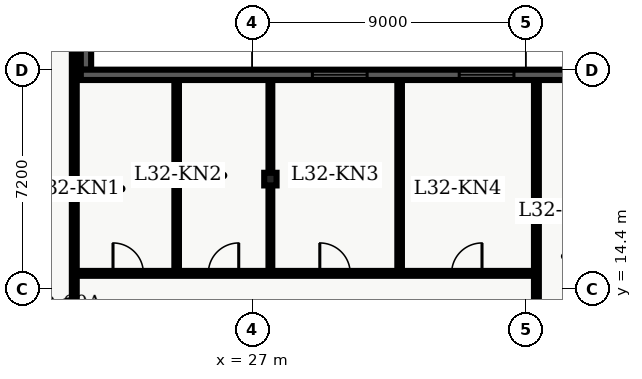
"""IFC4 building model, lengths in metres.
Left out: names, types, materials, properties, quantities, classifications, styles, units other than length and angle.
Written with IfcOpenShell. Run it as: python <this file> out.ifc"""

import sys

from ifc_helpers import new_model, entity, si_unit, converted_unit, direction, frame, origin_with_axes, origin_2d_with_axis, place, context, subcontext, project, spatial, polyline, rectangle, i_section, outline, extrude, element, fill, save


model = new_model("IFC4")
c1 = context("Model", 3, precision=1e-05, world=origin_with_axes(), true_north=direction((0.0, 1.0)))
c2 = subcontext(c1, "Body", "Model", "MODEL_VIEW")
j1 = project(units=[si_unit("LENGTHUNIT", "METRE"), converted_unit("PLANEANGLEUNIT", "DEGREE", entity("IfcPlaneAngleMeasure", 0.017), si_unit("PLANEANGLEUNIT", "RADIAN"), dimensions=[0, 0, 0, 0, 0, 0, 0])], contexts=[c1])
p1 = place(None, origin_with_axes())
s1 = spatial("IfcSite", under=j1, at=p1, CompositionType="ELEMENT")
p2 = place(p1, origin_with_axes())
s2 = spatial("IfcBuilding", under=s1, at=p2, CompositionType="ELEMENT")
p3 = place(p2, frame((0.0, 0.0, 132.9), z_axis=(0.0, 0.0, 1.0), x_axis=(1.0, 0.0, 0.0)))
s3 = spatial("IfcBuildingStorey", under=s2, at=p3, CompositionType="ELEMENT", Elevation=132.9)
p4 = place(p3, frame((27.6, 18.0, 0.0), z_axis=(0.0, 0.0, 1.0), x_axis=(1.0, 0.0, 0.0)))
e1 = element("IfcColumn", 1, at=p4, inside=s3, PredefinedType="COLUMN", context=c2, shape_type="SweptSolid", body=[
    extrude(i_section(OverallWidth=0.406, OverallDepth=0.416, WebThickness=0.03, FlangeThickness=0.048, FilletRadius=0.022, at=origin_2d_with_axis()), origin_with_axes(), (0.0, 0.0, 1.0), 3.9),
])
p5 = place(p3, frame((21.15, 7.8, 0.0), z_axis=(0.0, 0.0, 1.0), x_axis=(0.0, 1.0, 0.0)))
e2 = element("IfcWall", 2, at=p5, inside=s3, PredefinedType="PARTITIONING", context=c2, shape_type="SweptSolid", body=[
    extrude(outline(polyline([(0.0, -0.08), (32.7, -0.08), (32.7, 0.08), (0.0, 0.08), (0.0, -0.08)])), origin_with_axes(), (0.0, 0.0, 1.0), 2.7),
])
p6 = place(p5, frame((5.775, 0.0, 0.0), z_axis=(0.0, 0.0, 1.0), x_axis=(1.0, 0.0, 0.0)))
e3 = element("IfcOpeningElement", 3, at=p6, cuts=e2, PredefinedType="OPENING", context=c2, shape_type="SweptSolid", body=[
    extrude(rectangle(XDim=1.05, YDim=0.18, at=origin_2d_with_axis()), origin_with_axes(), (0.0, 0.0, 1.0), 2.15),
])
p7 = place(p3, frame((21.15, 14.9, 0.0), z_axis=(0.0, 0.0, 1.0), x_axis=(1.0, 0.0, 0.0)))
e4 = element("IfcWall", 4, at=p7, inside=s3, PredefinedType="PARTITIONING", context=c2, shape_type="SweptSolid", body=[
    extrude(outline(polyline([(0.0, -0.08), (15.2, -0.08), (15.2, 0.08), (0.0, 0.08), (0.0, -0.08)])), origin_with_axes(), (0.0, 0.0, 1.0), 2.7),
])
p8 = place(p7, frame((1.774, 0.0, 0.0), z_axis=(0.0, 0.0, 1.0), x_axis=(1.0, 0.0, 0.0)))
e5 = element("IfcOpeningElement", 5, at=p8, cuts=e4, PredefinedType="OPENING", context=c2, shape_type="SweptSolid", body=[
    extrude(rectangle(XDim=1.0, YDim=0.18, at=origin_2d_with_axis()), origin_with_axes(), (0.0, 0.0, 1.0), 2.15),
])
p9 = place(p7, frame((4.909, 0.0, 0.0), z_axis=(0.0, 0.0, 1.0), x_axis=(1.0, 0.0, 0.0)))
e6 = element("IfcOpeningElement", 6, at=p9, cuts=e4, PredefinedType="OPENING", context=c2, shape_type="SweptSolid", body=[
    extrude(rectangle(XDim=1.0, YDim=0.18, at=origin_2d_with_axis()), origin_with_axes(), (0.0, 0.0, 1.0), 2.15),
])
p10 = place(p7, frame((8.575, 0.0, 0.0), z_axis=(0.0, 0.0, 1.0), x_axis=(1.0, 0.0, 0.0)))
e7 = element("IfcOpeningElement", 7, at=p10, cuts=e4, PredefinedType="OPENING", context=c2, shape_type="SweptSolid", body=[
    extrude(rectangle(XDim=1.0, YDim=0.18, at=origin_2d_with_axis()), origin_with_axes(), (0.0, 0.0, 1.0), 2.15),
])
p11 = place(p7, frame((12.911, 0.0, 0.0), z_axis=(0.0, 0.0, 1.0), x_axis=(1.0, 0.0, 0.0)))
e8 = element("IfcOpeningElement", 8, at=p11, cuts=e4, PredefinedType="OPENING", context=c2, shape_type="SweptSolid", body=[
    extrude(rectangle(XDim=1.0, YDim=0.18, at=origin_2d_with_axis()), origin_with_axes(), (0.0, 0.0, 1.0), 2.15),
])
p12 = place(p3, frame((36.35, 4.35, 0.0), z_axis=(0.0, 0.0, 1.0), x_axis=(0.0, 1.0, 0.0)))
e9 = element("IfcWall", 9, at=p12, inside=s3, PredefinedType="PARTITIONING", context=c2, shape_type="SweptSolid", body=[
    extrude(outline(polyline([(0.0, -0.08), (16.95, -0.08), (16.95, 0.08), (0.0, 0.08), (0.0, -0.08)])), origin_with_axes(), (0.0, 0.0, 1.0), 2.7),
])
p13 = place(p3, frame((24.517, 15.02, 0.0), z_axis=(0.0, 0.0, 1.0), x_axis=(0.0, 1.0, 0.0)))
e10 = element("IfcWall", 10, at=p13, inside=s3, PredefinedType="PARTITIONING", context=c2, shape_type="SweptSolid", body=[
    extrude(outline(polyline([(0.0, -0.075), (6.245, -0.075), (6.245, 0.075), (0.0, 0.075), (0.0, -0.075)])), origin_with_axes(), (0.0, 0.0, 1.0), 2.7),
])
p14 = place(p3, frame((27.6, 15.02, 0.0), z_axis=(0.0, 0.0, 1.0), x_axis=(0.0, 1.0, 0.0)))
e11 = element("IfcWall", 11, at=p14, inside=s3, PredefinedType="PARTITIONING", context=c2, shape_type="SweptSolid", body=[
    extrude(outline(polyline([(0.0, -0.062), (6.245, -0.062), (6.245, 0.062), (0.0, 0.062), (0.0, -0.062)])), origin_with_axes(), (0.0, 0.0, 1.0), 2.7),
])
p15 = place(p3, frame((31.851, 15.02, 0.0), z_axis=(0.0, 0.0, 1.0), x_axis=(0.0, 1.0, 0.0)))
e12 = element("IfcWall", 12, at=p15, inside=s3, PredefinedType="PARTITIONING", context=c2, shape_type="SweptSolid", body=[
    extrude(outline(polyline([(0.0, -0.075), (6.245, -0.075), (6.245, 0.075), (0.0, 0.075), (0.0, -0.075)])), origin_with_axes(), (0.0, 0.0, 1.0), 2.7),
])
p16 = place(p3, frame((21.534, 46.7, 0.0), z_axis=(0.0, 0.0, 1.0), x_axis=(0.0, -1.0, 0.0)))
e13 = element("IfcWall", 13, at=p16, inside=s3, PredefinedType="SOLIDWALL", context=c2, shape_type="SweptSolid", body=[
    extrude(outline(polyline([(0.0, -0.17), (25.1, -0.17), (25.1, 0.17), (0.0, 0.17), (0.0, -0.17)])), origin_with_axes(), (0.0, 0.0, 1.0), 3.66),
])
p17 = place(p16, frame((2.99, 0.0, 0.45), z_axis=(0.0, 0.0, 1.0), x_axis=(1.0, 0.0, 0.0)))
e14 = element("IfcOpeningElement", 14, at=p17, cuts=e13, PredefinedType="OPENING", context=c2, shape_type="SweptSolid", body=[
    extrude(rectangle(XDim=1.6, YDim=0.36, at=origin_2d_with_axis()), origin_with_axes(), (0.0, 0.0, 1.0), 2.2),
])
p18 = place(p3, frame((21.364, 21.43, 0.0), z_axis=(0.0, 0.0, 1.0), x_axis=(1.0, 0.0, 0.0)))
e15 = element("IfcWall", 15, at=p18, inside=s3, PredefinedType="SOLIDWALL", context=c2, shape_type="SweptSolid", body=[
    extrude(outline(polyline([(0.0, -0.17), (17.036, -0.17), (17.036, 0.17), (0.0, 0.17), (0.0, -0.17)])), origin_with_axes(), (0.0, 0.0, 1.0), 3.66),
])
p19 = place(p18, frame((8.518, 0.0, 0.45), z_axis=(0.0, 0.0, 1.0), x_axis=(1.0, 0.0, 0.0)))
e16 = element("IfcOpeningElement", 16, at=p19, cuts=e15, PredefinedType="OPENING", context=c2, shape_type="SweptSolid", body=[
    extrude(rectangle(XDim=1.8, YDim=0.36, at=origin_2d_with_axis()), origin_with_axes(), (0.0, 0.0, 1.0), 2.1),
])
p20 = place(p18, frame((13.347, 0.0, 0.45), z_axis=(0.0, 0.0, 1.0), x_axis=(1.0, 0.0, 0.0)))
e17 = element("IfcOpeningElement", 17, at=p20, cuts=e15, PredefinedType="OPENING", context=c2, shape_type="SweptSolid", body=[
    extrude(rectangle(XDim=1.8, YDim=0.36, at=origin_2d_with_axis()), origin_with_axes(), (0.0, 0.0, 1.0), 2.1),
])
p21 = place(p5, frame((5.775, 0.0, 0.0), z_axis=(0.0, 0.0, 1.0), x_axis=(1.0, 0.0, 0.0)))
e18 = element("IfcDoor", 18, at=p21, inside=s3, OperationType="SINGLE_SWING_LEFT", PredefinedType="DOOR", context=c2, shape_type="SweptSolid", body=[
    extrude(rectangle(XDim=1.05, YDim=0.09, at=origin_2d_with_axis()), origin_with_axes(), (0.0, 0.0, 1.0), 2.15),
])
fill(e3, e18)
p22 = place(p7, frame((1.774, 0.0, 0.0), z_axis=(0.0, 0.0, 1.0), x_axis=(1.0, 0.0, 0.0)))
e19 = element("IfcDoor", 19, at=p22, inside=s3, OperationType="SINGLE_SWING_LEFT", PredefinedType="DOOR", context=c2, shape_type="SweptSolid", body=[
    extrude(rectangle(XDim=1.0, YDim=0.09, at=origin_2d_with_axis()), origin_with_axes(), (0.0, 0.0, 1.0), 2.15),
])
fill(e5, e19)
p23 = place(p7, frame((4.909, 0.0, 0.0), z_axis=(0.0, 0.0, 1.0), x_axis=(1.0, 0.0, 0.0)))
e20 = element("IfcDoor", 20, at=p23, inside=s3, OperationType="SINGLE_SWING_RIGHT", PredefinedType="DOOR", context=c2, shape_type="SweptSolid", body=[
    extrude(rectangle(XDim=1.0, YDim=0.09, at=origin_2d_with_axis()), origin_with_axes(), (0.0, 0.0, 1.0), 2.15),
])
fill(e6, e20)
p24 = place(p7, frame((8.575, 0.0, 0.0), z_axis=(0.0, 0.0, 1.0), x_axis=(1.0, 0.0, 0.0)))
e21 = element("IfcDoor", 21, at=p24, inside=s3, OperationType="SINGLE_SWING_LEFT", PredefinedType="DOOR", context=c2, shape_type="SweptSolid", body=[
    extrude(rectangle(XDim=1.0, YDim=0.09, at=origin_2d_with_axis()), origin_with_axes(), (0.0, 0.0, 1.0), 2.15),
])
fill(e7, e21)
p25 = place(p7, frame((12.911, 0.0, 0.0), z_axis=(0.0, 0.0, 1.0), x_axis=(1.0, 0.0, 0.0)))
e22 = element("IfcDoor", 22, at=p25, inside=s3, OperationType="SINGLE_SWING_RIGHT", PredefinedType="DOOR", context=c2, shape_type="SweptSolid", body=[
    extrude(rectangle(XDim=1.0, YDim=0.09, at=origin_2d_with_axis()), origin_with_axes(), (0.0, 0.0, 1.0), 2.15),
])
fill(e8, e22)
p26 = place(p18, frame((8.518, 0.0, 0.45), z_axis=(0.0, 0.0, 1.0), x_axis=(1.0, 0.0, 0.0)))
e23 = element("IfcWindow", 23, at=p26, inside=s3, PredefinedType="WINDOW", context=c2, shape_type="SweptSolid", body=[
    extrude(rectangle(XDim=1.8, YDim=0.09, at=origin_2d_with_axis()), origin_with_axes(), (0.0, 0.0, 1.0), 2.1),
])
fill(e16, e23)
p27 = place(p18, frame((13.347, 0.0, 0.45), z_axis=(0.0, 0.0, 1.0), x_axis=(1.0, 0.0, 0.0)))
e24 = element("IfcWindow", 24, at=p27, inside=s3, PredefinedType="WINDOW", context=c2, shape_type="SweptSolid", body=[
    extrude(rectangle(XDim=1.8, YDim=0.09, at=origin_2d_with_axis()), origin_with_axes(), (0.0, 0.0, 1.0), 2.1),
])
fill(e17, e24)
save(model, sys.argv[1])
